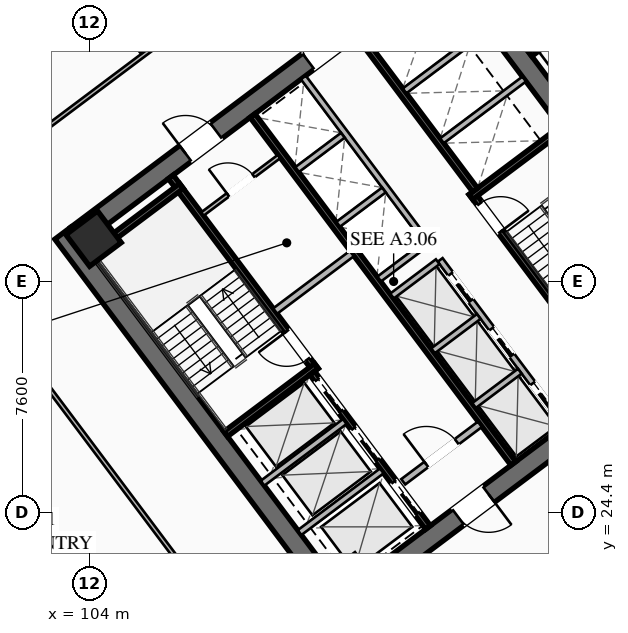
"""IFC4 building model, lengths in metres.
Left out: names, types, materials, properties, quantities, classifications, styles, units other than length and angle.
Written with IfcOpenShell. Run it as: python <this file> out.ifc"""

import sys

from ifc_helpers import new_model, si_unit, direction, frame, frame_2d, origin, origin_2d, place, context, subcontext, project, spatial, rectangle, hollow_rectangle, extrude, element, fill, save


model = new_model("IFC4")
c1 = context("Model", 3, precision=1e-05, world=origin(), true_north=direction((0.0, 1.0)))
c2 = subcontext(c1, "Body", "Model", "MODEL_VIEW")
j1 = project(units=[si_unit("LENGTHUNIT", "METRE"), si_unit("PLANEANGLEUNIT", "RADIAN")], contexts=[c1])
p1 = place(None, origin())
s1 = spatial("IfcSite", under=j1, at=p1, CompositionType="ELEMENT")
p2 = place(p1, origin())
s2 = spatial("IfcBuilding", under=s1, at=p2, CompositionType="ELEMENT")
p3 = place(p2, frame((0.0, 0.0, 77.85)))
s3 = spatial("IfcBuildingStorey", under=s2, at=p3, CompositionType="ELEMENT", Elevation=77.85)
for number, where, z_axis, x_axis in (
    (1, (112.476, 21.107, 0.0), (0.0, 0.0, 1.0), (-0.6, 0.8, 0.0)),
    (2, (115.524, 42.893, 0.0), (0.0, 0.0, 1.0), (0.6, -0.8, 0.0)),
):
    element("IfcWall", number, at=place(p3, frame(where, z_axis=z_axis, x_axis=x_axis)), inside=s3, PredefinedType="SHEAR", context=c2, shape_type="SweptSolid", body=[
        extrude(rectangle(XDim=15.6, YDim=0.65, at=frame_2d((7.8, 0.0))), origin(), (0.0, 0.0, 1.0), 3.55),
    ])
p4 = place(p3, frame((124.429, 30.478, 0.0), z_axis=(0.0, 0.0, 1.0), x_axis=(-0.799998028465, -0.600002628705, 0.0)))
e3 = element("IfcWall", 3, at=p4, inside=s3, PredefinedType="SHEAR", context=c2, shape_type="SweptSolid", body=[
    extrude(rectangle(XDim=14.86, YDim=0.65, at=frame_2d((7.43, 0.0))), origin(), (0.0, 0.0, 1.0), 3.55),
])
p5 = place(p4, frame((9.13, 0.0, 0.0)))
e4 = element("IfcOpeningElement", 4, at=p5, cuts=e3, PredefinedType="OPENING", context=c2, shape_type="SweptSolid", body=[
    extrude(rectangle(XDim=1.25, YDim=2.25, at=frame_2d((0.625, 1.125))), frame((0.0, 0.335, 0.0), z_axis=(0.0, -1.0, 0.0), x_axis=(1.0, 0.0, 0.0)), (0.0, 0.0, 1.0), 0.67),
])
p6 = place(p4, frame((4.08, 0.0, 0.0)))
e5 = element("IfcOpeningElement", 5, at=p6, cuts=e3, PredefinedType="OPENING", context=c2, shape_type="SweptSolid", body=[
    extrude(rectangle(XDim=1.25, YDim=2.25, at=frame_2d((0.625, 1.125))), frame((0.0, 0.335, 0.0), z_axis=(0.0, -1.0, 0.0), x_axis=(1.0, 0.0, 0.0)), (0.0, 0.0, 1.0), 0.67),
])
p7 = place(p3, frame((103.571, 33.522, 0.0), z_axis=(0.0, 0.0, 1.0), x_axis=(0.799998028465, 0.600002628705, 0.0)))
e6 = element("IfcWall", 6, at=p7, inside=s3, PredefinedType="SHEAR", context=c2, shape_type="SweptSolid", body=[
    extrude(rectangle(XDim=14.86, YDim=0.65, at=frame_2d((7.43, 0.0))), origin(), (0.0, 0.0, 1.0), 3.55),
])
p8 = place(p7, frame((4.48, 0.0, 0.0)))
e7 = element("IfcOpeningElement", 7, at=p8, cuts=e6, PredefinedType="OPENING", context=c2, shape_type="SweptSolid", body=[
    extrude(rectangle(XDim=1.25, YDim=2.25, at=frame_2d((0.625, 1.125))), frame((0.0, 0.335, 0.0), z_axis=(0.0, -1.0, 0.0), x_axis=(1.0, 0.0, 0.0)), (0.0, 0.0, 1.0), 0.67),
])
p9 = place(p7, frame((9.53, 0.0, 0.0)))
e8 = element("IfcOpeningElement", 8, at=p9, cuts=e6, PredefinedType="OPENING", context=c2, shape_type="SweptSolid", body=[
    extrude(rectangle(XDim=1.25, YDim=2.25, at=frame_2d((0.625, 1.125))), frame((0.0, 0.335, 0.0), z_axis=(0.0, -1.0, 0.0), x_axis=(1.0, 0.0, 0.0)), (0.0, 0.0, 1.0), 0.67),
])
p10 = place(p3, frame((104.13, 33.41, 0.0), z_axis=(0.0, 0.0, 1.0), x_axis=(0.799999996291, 0.600000004945, 0.0)))
e9 = element("IfcColumn", 9, at=p10, inside=s3, PredefinedType="COLUMN", context=c2, shape_type="SweptSolid", body=[
    extrude(hollow_rectangle(XDim=1.3, YDim=1.3, WallThickness=0.05, at=origin_2d()), origin(), (0.0, 0.0, 1.0), 3.35),
])
p11 = place(p3, frame((111.44, 29.08, 0.0), z_axis=(0.0, 0.0, 1.0), x_axis=(-0.600009827119, 0.799992629566, 0.0)))
e10 = element("IfcWall", 10, at=p11, inside=s3, PredefinedType="SHEAR", context=c2, shape_type="SweptSolid", body=[
    extrude(rectangle(XDim=7.95, YDim=0.2, at=frame_2d((3.975, 0.0))), origin(), (0.0, 0.0, 1.0), 3.35),
])
p12 = place(p11, frame((0.45, 0.0, 0.0)))
e11 = element("IfcOpeningElement", 11, at=p12, cuts=e10, PredefinedType="OPENING", context=c2, shape_type="SweptSolid", body=[
    extrude(rectangle(XDim=1.15, YDim=2.2, at=frame_2d((0.575, 1.1))), frame((0.0, 0.11, 0.0), z_axis=(0.0, -1.0, 0.0), x_axis=(1.0, 0.0, 0.0)), (0.0, 0.0, 1.0), 0.22),
])
for number, where, z_axis, x_axis in (
    (12, (108.476, 26.982, 0.0), (0.0, 0.0, 1.0), (0.8, 0.6, 0.0)),
    (13, (104.036, 32.902, 0.0), (0.0, 0.0, 1.0), (0.8, 0.6, 0.0)),
):
    element("IfcWall", number, at=place(p3, frame(where, z_axis=z_axis, x_axis=x_axis)), inside=s3, PredefinedType="SHEAR", context=c2, shape_type="SweptSolid", body=[
        extrude(rectangle(XDim=3.73, YDim=0.2, at=frame_2d((1.865, 0.0))), origin(), (0.0, 0.0, 1.0), 3.35),
    ])
p13 = place(p3, frame((116.56, 34.92, 0.0), z_axis=(0.0, 0.0, 1.0), x_axis=(0.600009827119, -0.799992629566, 0.0)))
e14 = element("IfcWall", 14, at=p13, inside=s3, PredefinedType="SHEAR", context=c2, shape_type="SweptSolid", body=[
    extrude(rectangle(XDim=7.95, YDim=0.2, at=frame_2d((3.975, 0.0))), origin(), (0.0, 0.0, 1.0), 3.35),
])
p14 = place(p13, frame((0.45, 0.0, 0.0)))
e15 = element("IfcOpeningElement", 15, at=p14, cuts=e14, PredefinedType="OPENING", context=c2, shape_type="SweptSolid", body=[
    extrude(rectangle(XDim=1.15, YDim=2.2, at=frame_2d((0.575, 1.1))), frame((0.0, 0.11, 0.0), z_axis=(0.0, -1.0, 0.0), x_axis=(1.0, 0.0, 0.0)), (0.0, 0.0, 1.0), 0.22),
])
p15 = place(p3, frame((116.54, 34.78, 0.0), z_axis=(0.0, 0.0, 1.0), x_axis=(0.799984290658, 0.600020945218, 0.0)))
e16 = element("IfcWall", 16, at=p15, inside=s3, PredefinedType="SHEAR", context=c2, shape_type="SweptSolid", body=[
    extrude(rectangle(XDim=3.73, YDim=0.2, at=frame_2d((1.865, 0.0))), origin(), (0.0, 0.0, 1.0), 3.35),
])
p16 = place(p3, frame((117.938, 26.016, 0.0), z_axis=(0.0, 0.0, 1.0), x_axis=(-0.600005463273, 0.799995902516, 0.0)))
e17 = element("IfcWall", 17, at=p16, inside=s3, PredefinedType="SHEAR", context=c2, shape_type="SweptSolid", body=[
    extrude(rectangle(XDim=14.3, YDim=0.2, at=frame_2d((7.15, 0.0))), origin(), (0.0, 0.0, 1.0), 3.35),
])
p17 = place(p3, frame((110.104, 31.028, 0.0), z_axis=(0.0, 0.0, 1.0), x_axis=(0.800018601094, 0.59997519774, 0.0)))
e18 = element("IfcWall", 18, at=p17, inside=s3, PredefinedType="SOLIDWALL", context=c2, shape_type="SweptSolid", body=[
    extrude(rectangle(XDim=3.15, YDim=0.22, at=frame_2d((1.575, 0.0))), origin(), (0.0, 0.0, 1.0), 2.703),
])
p18 = place(p3, frame((114.316, 25.412, 0.0), z_axis=(0.0, 0.0, 1.0), x_axis=(0.800018601094, 0.59997519774, 0.0)))
e19 = element("IfcWall", 19, at=p18, inside=s3, PredefinedType="SOLIDWALL", context=c2, shape_type="SweptSolid", body=[
    extrude(rectangle(XDim=3.15, YDim=0.22, at=frame_2d((1.575, 0.0))), origin(), (0.0, 0.0, 1.0), 2.703),
])
p19 = place(p18, frame((0.95, 0.0, 0.0)))
e20 = element("IfcOpeningElement", 20, at=p19, cuts=e19, PredefinedType="OPENING", context=c2, shape_type="SweptSolid", body=[
    extrude(rectangle(XDim=1.25, YDim=2.25, at=frame_2d((0.625, 1.125))), frame((0.0, 0.12, 0.0), z_axis=(0.0, -1.0, 0.0), x_axis=(1.0, 0.0, 0.0)), (0.0, 0.0, 1.0), 0.24),
])
p20 = place(p3, frame((115.13, 23.91, 0.0), z_axis=(0.0, 0.0, 1.0), x_axis=(-0.599975393228, 0.800018454488, 0.0)))
e21 = element("IfcWall", 21, at=p20, inside=s3, PredefinedType="SHEAR", context=c2, shape_type="SweptSolid", body=[
    extrude(rectangle(XDim=6.35, YDim=0.2, at=frame_2d((3.175, 0.0))), origin(), (0.0, 0.0, 1.0), 3.35),
])
p21 = place(p20, frame((4.775, 0.0, 0.0)))
e22 = element("IfcOpeningElement", 22, at=p21, cuts=e21, PredefinedType="OPENING", context=c2, shape_type="SweptSolid", body=[
    extrude(rectangle(XDim=1.3, YDim=2.25, at=frame_2d((0.65, 1.125))), frame((0.0, 0.11, 0.0), z_axis=(0.0, -1.0, 0.0), x_axis=(1.0, 0.0, 0.0)), (0.0, 0.0, 1.0), 0.22),
])
p22 = place(p20, frame((2.775, 0.0, 0.0)))
e23 = element("IfcOpeningElement", 23, at=p22, cuts=e21, PredefinedType="OPENING", context=c2, shape_type="SweptSolid", body=[
    extrude(rectangle(XDim=1.3, YDim=2.25, at=frame_2d((0.65, 1.125))), frame((0.0, 0.11, 0.0), z_axis=(0.0, -1.0, 0.0), x_axis=(1.0, 0.0, 0.0)), (0.0, 0.0, 1.0), 0.22),
])
p23 = place(p20, frame((0.575, 0.0, 0.0)))
e24 = element("IfcOpeningElement", 24, at=p23, cuts=e21, PredefinedType="OPENING", context=c2, shape_type="SweptSolid", body=[
    extrude(rectangle(XDim=1.3, YDim=2.25, at=frame_2d((0.65, 1.125))), frame((0.0, 0.11, 0.0), z_axis=(0.0, -1.0, 0.0), x_axis=(1.0, 0.0, 0.0)), (0.0, 0.0, 1.0), 0.22),
])
for number, where, z_axis, x_axis in (
    (25, (110.906, 23.742, 0.0), (0.0, 0.0, 1.0), (0.8, 0.6, 0.0)),
    (26, (109.688, 25.366, 0.0), (0.0, 0.0, 1.0), (0.8, 0.6, 0.0)),
):
    element("IfcWall", number, at=place(p3, frame(where, z_axis=z_axis, x_axis=x_axis)), inside=s3, PredefinedType="SOLIDWALL", context=c2, shape_type="SweptSolid", body=[
        extrude(rectangle(XDim=3.38, YDim=0.2, at=frame_2d((1.69, 0.0))), origin(), (0.0, 0.0, 1.0), 3.35),
    ])
p24 = place(p3, frame((112.87, 40.09, 0.0), z_axis=(0.0, 0.0, 1.0), x_axis=(0.599975393228, -0.800018454488, 0.0)))
e27 = element("IfcWall", 27, at=p24, inside=s3, PredefinedType="SHEAR", context=c2, shape_type="SweptSolid", body=[
    extrude(rectangle(XDim=6.35, YDim=0.2, at=frame_2d((3.175, 0.0))), origin(), (0.0, 0.0, 1.0), 3.35),
])
for number, where, z_axis, x_axis in (
    (28, (115.59, 36.63, 0.0), (0.0, 0.0, 1.0), (0.8, 0.6, 0.0)),
    (29, (114.36, 38.27, 0.0), (0.0, 0.0, 1.0), (0.8, 0.6, 0.0)),
):
    element("IfcWall", number, at=place(p3, frame(where, z_axis=z_axis, x_axis=x_axis)), inside=s3, PredefinedType="SOLIDWALL", context=c2, shape_type="SweptSolid", body=[
        extrude(rectangle(XDim=3.38, YDim=0.2, at=frame_2d((1.69, 0.0))), origin(), (0.0, 0.0, 1.0), 3.35),
    ])
p25 = place(p3, frame((107.71, 34.22, 0.0), z_axis=(0.0, 0.0, 1.0), x_axis=(0.799981399002, 0.60002480053, 0.0)))
e30 = element("IfcWall", 30, at=p25, inside=s3, PredefinedType="PARTITIONING", context=c2, shape_type="SweptSolid", body=[
    extrude(rectangle(XDim=3.15, YDim=0.135, at=frame_2d((1.575, 0.0))), origin(), (0.0, 0.0, 1.0), 2.703),
])
p26 = place(p25, frame((1.05, 0.0, 0.0)))
e31 = element("IfcOpeningElement", 31, at=p26, cuts=e30, PredefinedType="OPENING", context=c2, shape_type="SweptSolid", body=[
    extrude(rectangle(XDim=1.05, YDim=2.2, at=frame_2d((0.525, 1.1))), frame((0.0, 0.077, 0.0), z_axis=(0.0, -1.0, 0.0), x_axis=(1.0, 0.0, 0.0)), (0.0, 0.0, 1.0), 0.155),
])
p27 = place(p3, frame((119.61, 27.27, 0.0), z_axis=(0.0, 0.0, 1.0), x_axis=(-0.600011488909, 0.79999138319, 0.0)))
e32 = element("IfcWall", 32, at=p27, inside=s3, PredefinedType="SOLIDWALL", context=c2, shape_type="SweptSolid", body=[
    extrude(rectangle(XDim=6.8, YDim=0.2, at=frame_2d((3.4, 0.0))), origin(), (0.0, 0.0, 1.0), 3.35),
])
p28 = place(p27, frame((0.625, 0.0, 0.0)))
e33 = element("IfcOpeningElement", 33, at=p28, cuts=e32, PredefinedType="OPENING", context=c2, shape_type="SweptSolid", body=[
    extrude(rectangle(XDim=1.1, YDim=2.2, at=frame_2d((0.55, 1.1))), frame((0.0, 0.11, 0.0), z_axis=(0.0, -1.0, 0.0), x_axis=(1.0, 0.0, 0.0)), (0.0, 0.0, 1.0), 0.22),
])
p29 = place(p27, frame((2.875, 0.0, 0.0)))
e34 = element("IfcOpeningElement", 34, at=p29, cuts=e32, PredefinedType="OPENING", context=c2, shape_type="SweptSolid", body=[
    extrude(rectangle(XDim=1.1, YDim=2.2, at=frame_2d((0.55, 1.1))), frame((0.0, 0.11, 0.0), z_axis=(0.0, -1.0, 0.0), x_axis=(1.0, 0.0, 0.0)), (0.0, 0.0, 1.0), 0.22),
])
p30 = place(p27, frame((5.125, 0.0, 0.0)))
e35 = element("IfcOpeningElement", 35, at=p30, cuts=e32, PredefinedType="OPENING", context=c2, shape_type="SweptSolid", body=[
    extrude(rectangle(XDim=1.1, YDim=2.2, at=frame_2d((0.55, 1.1))), frame((0.0, 0.11, 0.0), z_axis=(0.0, -1.0, 0.0), x_axis=(1.0, 0.0, 0.0)), (0.0, 0.0, 1.0), 0.22),
])
p31 = place(p3, frame((116.646, 27.922, 0.0), z_axis=(0.0, 0.0, 1.0), x_axis=(0.8, 0.6, 0.0)))
e36 = element("IfcWall", 36, at=p31, inside=s3, PredefinedType="SOLIDWALL", context=c2, shape_type="SweptSolid", body=[
    extrude(rectangle(XDim=1.88, YDim=0.2, at=frame_2d((0.94, 0.0))), origin(), (0.0, 0.0, 1.0), 3.35),
])
p32 = place(p3, frame((115.296, 29.722, 0.0), z_axis=(0.0, 0.0, 1.0), x_axis=(0.799984418148, 0.600020775241, 0.0)))
e37 = element("IfcWall", 37, at=p32, inside=s3, PredefinedType="SOLIDWALL", context=c2, shape_type="SweptSolid", body=[
    extrude(rectangle(XDim=1.88, YDim=0.2, at=frame_2d((0.94, 0.0))), origin(), (0.0, 0.0, 1.0), 3.35),
])
p33 = place(p3, frame((113.946, 31.522, 0.0), z_axis=(0.0, 0.0, 1.0), x_axis=(0.8, 0.6, 0.0)))
e38 = element("IfcWall", 38, at=p33, inside=s3, PredefinedType="SOLIDWALL", context=c2, shape_type="SweptSolid", body=[
    extrude(rectangle(XDim=1.88, YDim=0.2, at=frame_2d((0.94, 0.0))), origin(), (0.0, 0.0, 1.0), 3.35),
])
p34 = place(p3, frame((115.11, 33.27, 0.0), z_axis=(0.0, 0.0, 1.0), x_axis=(-0.600011488909, 0.79999138319, 0.0)))
e39 = element("IfcWall", 39, at=p34, inside=s3, PredefinedType="SOLIDWALL", context=c2, shape_type="SweptSolid", body=[
    extrude(rectangle(XDim=6.8, YDim=0.2, at=frame_2d((3.4, 0.0))), origin(), (0.0, 0.0, 1.0), 3.35),
])
p35 = place(p3, frame((113.526, 32.082, 0.0), z_axis=(0.0, 0.0, 1.0), x_axis=(0.800046745961, 0.599937666993, 0.0)))
e40 = element("IfcWall", 40, at=p35, inside=s3, PredefinedType="SOLIDWALL", context=c2, shape_type="SweptSolid", body=[
    extrude(rectangle(XDim=1.88, YDim=0.2, at=frame_2d((0.94, 0.0))), origin(), (0.0, 0.0, 1.0), 3.35),
])
p36 = place(p3, frame((112.176, 33.882, 0.0), z_axis=(0.0, 0.0, 1.0), x_axis=(0.8, 0.6, 0.0)))
e41 = element("IfcWall", 41, at=p36, inside=s3, PredefinedType="SOLIDWALL", context=c2, shape_type="SweptSolid", body=[
    extrude(rectangle(XDim=1.88, YDim=0.2, at=frame_2d((0.94, 0.0))), origin(), (0.0, 0.0, 1.0), 3.35),
])
p37 = place(p3, frame((110.826, 35.682, 0.0), z_axis=(0.0, 0.0, 1.0), x_axis=(0.799984418148, 0.600020775241, 0.0)))
e42 = element("IfcWall", 42, at=p37, inside=s3, PredefinedType="SOLIDWALL", context=c2, shape_type="SweptSolid", body=[
    extrude(rectangle(XDim=1.88, YDim=0.2, at=frame_2d((0.94, 0.0))), origin(), (0.0, 0.0, 1.0), 3.35),
])
p38 = place(p3, frame((121.204, 41.528, 0.0), z_axis=(0.0, 0.0, 1.0), x_axis=(-0.800017232136, -0.599977023131, 0.0)))
e43 = element("IfcWall", 43, at=p38, inside=s3, PredefinedType="SHEAR", context=c2, shape_type="SweptSolid", body=[
    extrude(rectangle(XDim=3.4, YDim=0.2, at=frame_2d((1.7, 0.0))), origin(), (0.0, 0.0, 1.0), 3.35),
])
p39 = place(p38, frame((1.975, 0.0, 0.0)))
e44 = element("IfcOpeningElement", 44, at=p39, cuts=e43, PredefinedType="OPENING", context=c2, shape_type="SweptSolid", body=[
    extrude(rectangle(XDim=1.15, YDim=2.2, at=frame_2d((0.575, 1.1))), frame((0.0, 0.11, 0.0), z_axis=(0.0, -1.0, 0.0), x_axis=(1.0, 0.0, 0.0)), (0.0, 0.0, 1.0), 0.22),
])
p40 = place(p3, frame((98.516, 34.012, 0.0), z_axis=(0.0, 0.0, 1.0), x_axis=(0.8, 0.6, 0.0)))
e45 = element("IfcWall", 45, at=p40, inside=s3, PredefinedType="PARTITIONING", context=c2, shape_type="SweptSolid", body=[
    extrude(rectangle(XDim=28.23, YDim=0.135, at=frame_2d((14.115, 0.0))), origin(), (0.0, 0.0, 1.0), 2.703),
])
p41 = place(p40, frame((0.3, 0.0, 0.0)))
e46 = element("IfcOpeningElement", 46, at=p41, cuts=e45, PredefinedType="OPENING", context=c2, shape_type="SweptSolid", body=[
    extrude(rectangle(XDim=0.95, YDim=2.05, at=frame_2d((0.475, 1.025))), frame((0.0, 0.077, 0.0), z_axis=(0.0, -1.0, 0.0), x_axis=(1.0, 0.0, 0.0)), (0.0, 0.0, 1.0), 0.155),
])
p42 = place(p40, frame((11.004, 0.0, 0.0)))
e47 = element("IfcOpeningElement", 47, at=p42, cuts=e45, PredefinedType="OPENING", context=c2, shape_type="SweptSolid", body=[
    extrude(rectangle(XDim=0.95, YDim=2.05, at=frame_2d((0.475, 1.025))), frame((0.0, 0.077, 0.0), z_axis=(0.0, -1.0, 0.0), x_axis=(1.0, 0.0, 0.0)), (0.0, 0.0, 1.0), 0.155),
])
p43 = place(p40, frame((26.98, 0.0, 0.0)))
e48 = element("IfcOpeningElement", 48, at=p43, cuts=e45, PredefinedType="OPENING", context=c2, shape_type="SweptSolid", body=[
    extrude(rectangle(XDim=0.95, YDim=2.05, at=frame_2d((0.475, 1.025))), frame((0.0, 0.077, 0.0), z_axis=(0.0, -1.0, 0.0), x_axis=(1.0, 0.0, 0.0)), (0.0, 0.0, 1.0), 0.155),
])
p44 = place(p3, frame((105.732, 39.524, 0.0), z_axis=(0.0, 0.0, 1.0), x_axis=(-0.599982443676, 0.800013166942, 0.0)))
e49 = element("IfcWall", 49, at=p44, inside=s3, PredefinedType="PARTITIONING", context=c2, shape_type="SweptSolid", body=[
    extrude(rectangle(XDim=8.9, YDim=0.11, at=frame_2d((4.45, 0.0))), origin(), (0.0, 0.0, 1.0), 2.703),
])
p45 = place(p3, frame((134.18, 33.51, 0.0), z_axis=(0.0, 0.0, 1.0), x_axis=(-0.8, -0.6, 0.0)))
e50 = element("IfcWall", 50, at=p45, inside=s3, PredefinedType="PARTITIONING", context=c2, shape_type="SweptSolid", body=[
    extrude(rectangle(XDim=28.23, YDim=0.135, at=frame_2d((14.115, 0.0))), origin(), (0.0, 0.0, 1.0), 2.703),
])
p46 = place(p45, frame((26.9, 0.0, 0.0)))
e51 = element("IfcOpeningElement", 51, at=p46, cuts=e50, PredefinedType="OPENING", context=c2, shape_type="SweptSolid", body=[
    extrude(rectangle(XDim=0.95, YDim=2.05, at=frame_2d((0.475, 1.025))), frame((0.0, 0.077, 0.0), z_axis=(0.0, -1.0, 0.0), x_axis=(1.0, 0.0, 0.0)), (0.0, 0.0, 1.0), 0.155),
])
p47 = place(p45, frame((16.453, 0.0, 0.0)))
e52 = element("IfcOpeningElement", 52, at=p47, cuts=e50, PredefinedType="OPENING", context=c2, shape_type="SweptSolid", body=[
    extrude(rectangle(XDim=0.95, YDim=2.05, at=frame_2d((0.475, 1.025))), frame((0.0, 0.077, 0.0), z_axis=(0.0, -1.0, 0.0), x_axis=(1.0, 0.0, 0.0)), (0.0, 0.0, 1.0), 0.155),
])
p48 = place(p45, frame((0.38, 0.0, 0.0)))
e53 = element("IfcOpeningElement", 53, at=p48, cuts=e50, PredefinedType="OPENING", context=c2, shape_type="SweptSolid", body=[
    extrude(rectangle(XDim=0.95, YDim=2.05, at=frame_2d((0.475, 1.025))), frame((0.0, 0.077, 0.0), z_axis=(0.0, -1.0, 0.0), x_axis=(1.0, 0.0, 0.0)), (0.0, 0.0, 1.0), 0.155),
])
p49 = place(p3, frame((111.548, 16.636, 0.0), z_axis=(0.0, 0.0, 1.0), x_axis=(-0.600003610192, 0.799997292343, 0.0)))
e54 = element("IfcWall", 54, at=p49, inside=s3, PredefinedType="PARTITIONING", context=c2, shape_type="SweptSolid", body=[
    extrude(rectangle(XDim=21.64, YDim=0.135, at=frame_2d((10.82, 0.0))), origin(), (0.0, 0.0, 1.0), 2.703),
])
p50 = place(p49, frame((0.3, 0.0, 0.0)))
e55 = element("IfcOpeningElement", 55, at=p50, cuts=e54, PredefinedType="OPENING", context=c2, shape_type="SweptSolid", body=[
    extrude(rectangle(XDim=0.95, YDim=2.05, at=frame_2d((0.475, 1.025))), frame((0.0, 0.077, 0.0), z_axis=(0.0, -1.0, 0.0), x_axis=(1.0, 0.0, 0.0)), (0.0, 0.0, 1.0), 0.155),
])
p51 = place(p8, origin())
e56 = element("IfcDoor", 56, at=p51, inside=s3, OperationType="SINGLE_SWING_LEFT", PredefinedType="DOOR", context=c2, shape_type="SweptSolid", body=[
    extrude(rectangle(XDim=1.25, YDim=2.25, at=frame_2d((0.625, 1.125))), frame((0.0, 0.025, 0.0), z_axis=(0.0, -1.0, 0.0), x_axis=(1.0, 0.0, 0.0)), (0.0, 0.0, 1.0), 0.05),
])
fill(e7, e56)
p52 = place(p9, origin())
e57 = element("IfcDoor", 57, at=p52, inside=s3, OperationType="SINGLE_SWING_RIGHT", PredefinedType="DOOR", context=c2, shape_type="SweptSolid", body=[
    extrude(rectangle(XDim=1.25, YDim=2.25, at=frame_2d((0.625, 1.125))), frame((0.0, 0.025, 0.0), z_axis=(0.0, -1.0, 0.0), x_axis=(1.0, 0.0, 0.0)), (0.0, 0.0, 1.0), 0.05),
])
fill(e8, e57)
p53 = place(p5, origin())
e58 = element("IfcDoor", 58, at=p53, inside=s3, OperationType="SINGLE_SWING_LEFT", PredefinedType="DOOR", context=c2, shape_type="SweptSolid", body=[
    extrude(rectangle(XDim=1.25, YDim=2.25, at=frame_2d((0.625, 1.125))), frame((0.0, 0.025, 0.0), z_axis=(0.0, -1.0, 0.0), x_axis=(1.0, 0.0, 0.0)), (0.0, 0.0, 1.0), 0.05),
])
fill(e4, e58)
p54 = place(p12, origin())
e59 = element("IfcDoor", 59, at=p54, inside=s3, OperationType="SINGLE_SWING_RIGHT", PredefinedType="DOOR", context=c2, shape_type="SweptSolid", body=[
    extrude(rectangle(XDim=1.15, YDim=2.2, at=frame_2d((0.575, 1.1))), frame((0.0, 0.025, 0.0), z_axis=(0.0, -1.0, 0.0), x_axis=(1.0, 0.0, 0.0)), (0.0, 0.0, 1.0), 0.05),
])
fill(e11, e59)
p55 = place(p14, origin())
e60 = element("IfcDoor", 60, at=p55, inside=s3, OperationType="SINGLE_SWING_RIGHT", PredefinedType="DOOR", context=c2, shape_type="SweptSolid", body=[
    extrude(rectangle(XDim=1.15, YDim=2.2, at=frame_2d((0.575, 1.1))), frame((0.0, 0.025, 0.0), z_axis=(0.0, -1.0, 0.0), x_axis=(1.0, 0.0, 0.0)), (0.0, 0.0, 1.0), 0.05),
])
fill(e15, e60)
p56 = place(p19, origin())
e61 = element("IfcDoor", 61, at=p56, inside=s3, OperationType="SINGLE_SWING_LEFT", PredefinedType="DOOR", context=c2, shape_type="SweptSolid", body=[
    extrude(rectangle(XDim=1.25, YDim=2.25, at=frame_2d((0.625, 1.125))), frame((0.0, 0.025, 0.0), z_axis=(0.0, -1.0, 0.0), x_axis=(1.0, 0.0, 0.0)), (0.0, 0.0, 1.0), 0.05),
])
fill(e20, e61)
p57 = place(p26, origin())
e62 = element("IfcDoor", 62, at=p57, inside=s3, OperationType="SINGLE_SWING_LEFT", PredefinedType="DOOR", context=c2, shape_type="SweptSolid", body=[
    extrude(rectangle(XDim=1.05, YDim=2.2, at=frame_2d((0.525, 1.1))), frame((0.0, 0.025, 0.0), z_axis=(0.0, -1.0, 0.0), x_axis=(1.0, 0.0, 0.0)), (0.0, 0.0, 1.0), 0.05),
])
fill(e31, e62)
p58 = place(p21, origin())
e63 = element("IfcDoor", 63, at=p58, inside=s3, OperationType="SLIDING_TO_LEFT", PredefinedType="DOOR", context=c2, shape_type="SweptSolid", body=[
    extrude(rectangle(XDim=1.3, YDim=2.25, at=frame_2d((0.65, 1.125))), frame((0.0, 0.025, 0.0), z_axis=(0.0, -1.0, 0.0), x_axis=(1.0, 0.0, 0.0)), (0.0, 0.0, 1.0), 0.05),
])
fill(e22, e63)
p59 = place(p22, origin())
e64 = element("IfcDoor", 64, at=p59, inside=s3, OperationType="SLIDING_TO_LEFT", PredefinedType="DOOR", context=c2, shape_type="SweptSolid", body=[
    extrude(rectangle(XDim=1.3, YDim=2.25, at=frame_2d((0.65, 1.125))), frame((0.0, 0.025, 0.0), z_axis=(0.0, -1.0, 0.0), x_axis=(1.0, 0.0, 0.0)), (0.0, 0.0, 1.0), 0.05),
])
fill(e23, e64)
p60 = place(p23, origin())
e65 = element("IfcDoor", 65, at=p60, inside=s3, OperationType="SLIDING_TO_LEFT", PredefinedType="DOOR", context=c2, shape_type="SweptSolid", body=[
    extrude(rectangle(XDim=1.3, YDim=2.25, at=frame_2d((0.65, 1.125))), frame((0.0, 0.025, 0.0), z_axis=(0.0, -1.0, 0.0), x_axis=(1.0, 0.0, 0.0)), (0.0, 0.0, 1.0), 0.05),
])
fill(e24, e65)
p61 = place(p28, origin())
e66 = element("IfcDoor", 66, at=p61, inside=s3, OperationType="SLIDING_TO_LEFT", PredefinedType="DOOR", context=c2, shape_type="SweptSolid", body=[
    extrude(rectangle(XDim=1.1, YDim=2.2, at=frame_2d((0.55, 1.1))), frame((0.0, 0.025, 0.0), z_axis=(0.0, -1.0, 0.0), x_axis=(1.0, 0.0, 0.0)), (0.0, 0.0, 1.0), 0.05),
])
fill(e33, e66)
p62 = place(p29, origin())
e67 = element("IfcDoor", 67, at=p62, inside=s3, OperationType="SLIDING_TO_LEFT", PredefinedType="DOOR", context=c2, shape_type="SweptSolid", body=[
    extrude(rectangle(XDim=1.1, YDim=2.2, at=frame_2d((0.55, 1.1))), frame((0.0, 0.025, 0.0), z_axis=(0.0, -1.0, 0.0), x_axis=(1.0, 0.0, 0.0)), (0.0, 0.0, 1.0), 0.05),
])
fill(e34, e67)
p63 = place(p30, origin())
e68 = element("IfcDoor", 68, at=p63, inside=s3, OperationType="SLIDING_TO_LEFT", PredefinedType="DOOR", context=c2, shape_type="SweptSolid", body=[
    extrude(rectangle(XDim=1.1, YDim=2.2, at=frame_2d((0.55, 1.1))), frame((0.0, 0.025, 0.0), z_axis=(0.0, -1.0, 0.0), x_axis=(1.0, 0.0, 0.0)), (0.0, 0.0, 1.0), 0.05),
])
fill(e35, e68)
save(model, sys.argv[1])
